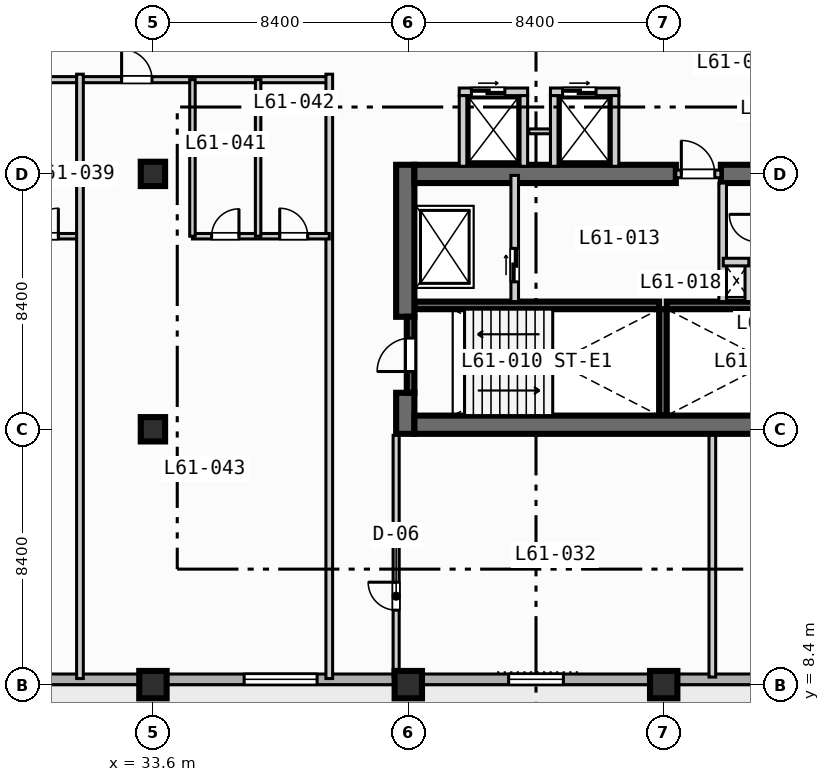
"""IFC4 building model, lengths in metres.
Left out: names, types, materials, properties, quantities, classifications, styles, units other than length and angle.
Written with IfcOpenShell. Run it as: python <this file> out.ifc"""

import sys

from ifc_helpers import new_model, si_unit, direction, frame, frame_2d, origin, origin_2d, place, context, subcontext, project, spatial, rectangle, extrude, element, fill, save


model = new_model("IFC4")
c1 = context("Model", 3, precision=1e-05, world=origin(), true_north=direction((0.0, 1.0)))
c2 = subcontext(c1, "Body", "Model", "MODEL_VIEW")
j1 = project(units=[si_unit("LENGTHUNIT", "METRE"), si_unit("PLANEANGLEUNIT", "RADIAN")], contexts=[c1])
p1 = place(None, origin())
s1 = spatial("IfcSite", under=j1, at=p1, CompositionType="ELEMENT")
p2 = place(p1, origin())
s2 = spatial("IfcBuilding", under=s1, at=p2, CompositionType="ELEMENT")
p3 = place(p2, frame((0.0, 0.0, 249.0)))
s3 = spatial("IfcBuildingStorey", under=s2, at=p3, CompositionType="ELEMENT", Elevation=249.0)
for number, where, z_axis, x_axis in (
    (1, (42.2, 20.875, 0.0), (0.0, 0.0, 1.0), (1.0, 0.0, 0.0)),
    (2, (50.5, 20.875, 0.0), (0.0, 0.0, 1.0), (1.0, 0.0, 0.0)),
):
    element("IfcWall", number, at=place(p3, frame(where, z_axis=z_axis, x_axis=x_axis)), inside=s3, PredefinedType="SOLIDWALL", context=c2, shape_type="SweptSolid", body=[
        extrude(rectangle(XDim=8.05, YDim=0.25, at=frame_2d((4.025, 0.0))), origin(), (0.0, 0.0, 1.0), 3.47),
    ])
p4 = place(p3, frame((50.375, 17.25, 0.0), z_axis=(0.0, 0.0, 1.0), x_axis=(0.0, 1.0, 0.0)))
e3 = element("IfcWall", 3, at=p4, inside=s3, PredefinedType="SOLIDWALL", context=c2, shape_type="SweptSolid", body=[
    extrude(rectangle(XDim=3.5, YDim=0.25, at=frame_2d((1.75, 0.0))), origin(), (0.0, 0.0, 1.0), 3.47),
])
p5 = place(p3, frame((41.9, 16.65, 0.0), z_axis=(0.0, 0.0, 1.0), x_axis=(0.0, 1.0, 0.0)))
e4 = element("IfcWall", 4, at=p5, inside=s3, PredefinedType="SHEAR", context=c2, shape_type="SweptSolid", body=[
    extrude(rectangle(XDim=1.35, YDim=0.6, at=frame_2d((0.675, 0.0))), origin(), (0.0, 0.0, 1.0), 3.47),
])
p6 = place(p3, frame((41.9, 20.5, 0.0), z_axis=(0.0, 0.0, 1.0), x_axis=(0.0, 1.0, 0.0)))
e5 = element("IfcWall", 5, at=p6, inside=s3, PredefinedType="SHEAR", context=c2, shape_type="SweptSolid", body=[
    extrude(rectangle(XDim=5.0, YDim=0.6, at=frame_2d((2.5, 0.0))), origin(), (0.0, 0.0, 1.0), 3.47),
])
p7 = place(p3, frame((42.2, 16.95, 0.0), z_axis=(0.0, 0.0, 1.0), x_axis=(1.0, 0.0, 0.0)))
e6 = element("IfcWall", 6, at=p7, inside=s3, PredefinedType="SHEAR", context=c2, shape_type="SweptSolid", body=[
    extrude(rectangle(XDim=16.35, YDim=0.6, at=frame_2d((8.175, 0.0))), origin(), (0.0, 0.0, 1.0), 3.47),
])
p8 = place(p3, frame((42.2, 25.2, 0.0), z_axis=(0.0, 0.0, 1.0), x_axis=(1.0, 0.0, 0.0)))
e7 = element("IfcWall", 7, at=p8, inside=s3, PredefinedType="SHEAR", context=c2, shape_type="SweptSolid", body=[
    extrude(rectangle(XDim=8.6, YDim=0.6, at=frame_2d((4.3, 0.0))), origin(), (0.0, 0.0, 1.0), 3.47),
])
p9 = place(p3, frame((52.28, 25.2, 0.0), z_axis=(0.0, 0.0, 1.0), x_axis=(1.0, 0.0, 0.0)))
e8 = element("IfcWall", 8, at=p9, inside=s3, PredefinedType="SHEAR", context=c2, shape_type="SweptSolid", body=[
    extrude(rectangle(XDim=1.27, YDim=0.6, at=frame_2d((0.635, 0.0))), origin(), (0.0, 0.0, 1.0), 3.47),
])
p10 = place(p3, frame((33.6, 8.4, 0.0), z_axis=(0.0, 0.0, 1.0), x_axis=(1.0, 0.0, 0.0)))
e9 = element("IfcColumn", 9, at=p10, inside=s3, PredefinedType="COLUMN", context=c2, shape_type="SweptSolid", body=[
    extrude(rectangle(XDim=0.9, YDim=0.9, at=origin_2d()), origin(), (0.0, 0.0, 1.0), 3.7),
])
for number, where, z_axis, x_axis in (
    (10, (33.6, 16.8, 0.0), (0.0, 0.0, 1.0), (1.0, 0.0, 0.0)),
    (11, (33.6, 25.2, 0.0), (0.0, 0.0, 1.0), (1.0, 0.0, 0.0)),
):
    element("IfcColumn", number, at=place(p3, frame(where, z_axis=z_axis, x_axis=x_axis)), inside=s3, PredefinedType="COLUMN", context=c2, shape_type="SweptSolid", body=[
        extrude(rectangle(XDim=0.8, YDim=0.8, at=origin_2d()), origin(), (0.0, 0.0, 1.0), 3.7),
    ])
for number, where, z_axis, x_axis in (
    (12, (42.0, 8.4, 0.0), (0.0, 0.0, 1.0), (1.0, 0.0, 0.0)),
    (13, (50.4, 8.4, 0.0), (0.0, 0.0, 1.0), (1.0, 0.0, 0.0)),
):
    element("IfcColumn", number, at=place(p3, frame(where, z_axis=z_axis, x_axis=x_axis)), inside=s3, PredefinedType="COLUMN", context=c2, shape_type="SweptSolid", body=[
        extrude(rectangle(XDim=0.9, YDim=0.9, at=origin_2d()), origin(), (0.0, 0.0, 1.0), 3.7),
    ])
p11 = place(p3, frame((72.425, 8.575, 0.0), z_axis=(0.0, 0.0, 1.0), x_axis=(-1.0, 0.0, 0.0)))
e14 = element("IfcWall", 14, at=p11, inside=s3, PredefinedType="STANDARD", context=c2, shape_type="SweptSolid", body=[
    extrude(rectangle(XDim=60.85, YDim=0.35, at=frame_2d((30.425, 0.0))), origin(), (0.0, 0.0, 1.0), 3.47),
])
p12 = place(p11, frame((42.325, 0.0, 0.0)))
e15 = element("IfcOpeningElement", 15, at=p12, cuts=e14, PredefinedType="OPENING", context=c2, shape_type="SweptSolid", body=[
    extrude(rectangle(XDim=1.4, YDim=2.2, at=frame_2d((0.7, 1.1))), frame((0.0, 0.185, 0.0), z_axis=(0.0, -1.0, 0.0), x_axis=(1.0, 0.0, 0.0)), (0.0, 0.0, 1.0), 0.37),
])
p13 = place(p11, frame((50.225, 0.0, 0.85)))
e16 = element("IfcOpeningElement", 16, at=p13, cuts=e14, PredefinedType="OPENING", context=c2, shape_type="SweptSolid", body=[
    extrude(rectangle(XDim=2.4, YDim=1.95, at=frame_2d((1.2, 0.975))), frame((0.0, 0.185, 0.0), z_axis=(0.0, -1.0, 0.0), x_axis=(1.0, 0.0, 0.0)), (0.0, 0.0, 1.0), 0.37),
])
p14 = place(p11, frame((33.425, 0.0, 0.85)))
e17 = element("IfcOpeningElement", 17, at=p14, cuts=e14, PredefinedType="OPENING", context=c2, shape_type="SweptSolid", body=[
    extrude(rectangle(XDim=2.4, YDim=1.95, at=frame_2d((1.2, 0.975))), frame((0.0, 0.185, 0.0), z_axis=(0.0, -1.0, 0.0), x_axis=(1.0, 0.0, 0.0)), (0.0, 0.0, 1.0), 0.37),
])
p15 = place(p11, frame((25.325, 0.0, 0.85)))
e18 = element("IfcOpeningElement", 18, at=p15, cuts=e14, PredefinedType="OPENING", context=c2, shape_type="SweptSolid", body=[
    extrude(rectangle(XDim=1.8, YDim=1.8, at=frame_2d((0.9, 0.9))), frame((0.0, 0.185, 0.0), z_axis=(0.0, -1.0, 0.0), x_axis=(1.0, 0.0, 0.0)), (0.0, 0.0, 1.0), 0.37),
])
p16 = place(p11, frame((58.675, 0.0, 0.85)))
e19 = element("IfcOpeningElement", 19, at=p16, cuts=e14, PredefinedType="OPENING", context=c2, shape_type="SweptSolid", body=[
    extrude(rectangle(XDim=1.8, YDim=1.8, at=frame_2d((0.9, 0.9))), frame((0.0, 0.185, 0.0), z_axis=(0.0, -1.0, 0.0), x_axis=(1.0, 0.0, 0.0)), (0.0, 0.0, 1.0), 0.37),
])
p17 = place(p3, frame((42.075, 18.0, 0.0), z_axis=(0.0, 0.0, 1.0), x_axis=(0.0, 1.0, 0.0)))
e20 = element("IfcWall", 20, at=p17, inside=s3, PredefinedType="SOLIDWALL", context=c2, shape_type="SweptSolid", body=[
    extrude(rectangle(XDim=2.5, YDim=0.25, at=frame_2d((1.25, 0.0))), origin(), (0.0, 0.0, 1.0), 3.47),
])
p18 = place(p17, frame((0.7, 0.0, 0.0)))
e21 = element("IfcOpeningElement", 21, at=p18, cuts=e20, PredefinedType="OPENING", context=c2, shape_type="SweptSolid", body=[
    extrude(rectangle(XDim=1.1, YDim=2.15, at=frame_2d((0.55, 1.075))), frame((0.0, 0.135, 0.0), z_axis=(0.0, -1.0, 0.0), x_axis=(1.0, 0.0, 0.0)), (0.0, 0.0, 1.0), 0.27),
])
p19 = place(p3, frame((45.5, 21.0, 0.0), z_axis=(0.0, 0.0, 1.0), x_axis=(0.0, 1.0, 0.0)))
e22 = element("IfcWall", 22, at=p19, inside=s3, PredefinedType="SOLIDWALL", context=c2, shape_type="SweptSolid", body=[
    extrude(rectangle(XDim=4.15, YDim=0.25, at=frame_2d((2.075, 0.0))), origin(), (0.0, 0.0, 1.0), 3.47),
])
p20 = place(p19, frame((0.65, 0.0, 0.0)))
e23 = element("IfcOpeningElement", 23, at=p20, cuts=e22, PredefinedType="OPENING", context=c2, shape_type="SweptSolid", body=[
    extrude(rectangle(XDim=1.1, YDim=2.15, at=frame_2d((0.55, 1.075))), frame((0.0, 0.135, 0.0), z_axis=(0.0, -1.0, 0.0), x_axis=(1.0, 0.0, 0.0)), (0.0, 0.0, 1.0), 0.27),
])
p21 = place(p3, frame((50.8, 25.2, 0.0), z_axis=(0.0, 0.0, 1.0), x_axis=(1.0, 0.0, 0.0)))
e24 = element("IfcWall", 24, at=p21, inside=s3, PredefinedType="SOLIDWALL", context=c2, shape_type="SweptSolid", body=[
    extrude(rectangle(XDim=1.48, YDim=0.25, at=frame_2d((0.74, 0.0))), origin(), (0.0, 0.0, 1.0), 3.47),
])
p22 = place(p21, frame((0.18, 0.0, 0.0)))
e25 = element("IfcOpeningElement", 25, at=p22, cuts=e24, PredefinedType="OPENING", context=c2, shape_type="SweptSolid", body=[
    extrude(rectangle(XDim=1.1, YDim=2.15, at=frame_2d((0.55, 1.075))), frame((0.0, 0.135, 0.0), z_axis=(0.0, -1.0, 0.0), x_axis=(1.0, 0.0, 0.0)), (0.0, 0.0, 1.0), 0.27),
])
p23 = place(p3, frame((52.34, 21.0, 0.0), z_axis=(0.0, 0.0, 1.0), x_axis=(0.0, 1.0, 0.0)))
e26 = element("IfcWall", 26, at=p23, inside=s3, PredefinedType="SOLIDWALL", context=c2, shape_type="SweptSolid", body=[
    extrude(rectangle(XDim=3.9, YDim=0.25, at=frame_2d((1.95, 0.0))), origin(), (0.0, 0.0, 1.0), 3.47),
])
p24 = place(p3, frame((53.2, 21.0, 0.0), z_axis=(0.0, 0.0, 1.0), x_axis=(0.0, 1.0, 0.0)))
e27 = element("IfcWall", 27, at=p24, inside=s3, PredefinedType="SOLIDWALL", context=c2, shape_type="SweptSolid", body=[
    extrude(rectangle(XDim=1.3, YDim=0.25, at=frame_2d((0.65, 0.0))), origin(), (0.0, 0.0, 1.0), 3.47),
])
p25 = place(p3, frame((52.36, 22.3, 0.0), z_axis=(0.0, 0.0, 1.0), x_axis=(1.0, 0.0, 0.0)))
e28 = element("IfcWall", 28, at=p25, inside=s3, PredefinedType="SOLIDWALL", context=c2, shape_type="SweptSolid", body=[
    extrude(rectangle(XDim=0.84, YDim=0.25, at=frame_2d((0.42, 0.0))), origin(), (0.0, 0.0, 1.0), 3.47),
])
p26 = place(p3, frame((43.675, 27.9, 0.0), z_axis=(0.0, 0.0, 1.0), x_axis=(1.0, 0.0, 0.0)))
e29 = element("IfcWall", 29, at=p26, inside=s3, PredefinedType="SOLIDWALL", context=c2, shape_type="SweptSolid", body=[
    extrude(rectangle(XDim=2.25, YDim=0.25, at=frame_2d((1.125, 0.0))), origin(), (0.0, 0.0, 1.0), 3.47),
])
p27 = place(p26, frame((0.4, 0.0, 0.0)))
e30 = element("IfcOpeningElement", 30, at=p27, cuts=e29, PredefinedType="OPENING", context=c2, shape_type="SweptSolid", body=[
    extrude(rectangle(XDim=1.1, YDim=2.15, at=frame_2d((0.55, 1.075))), frame((0.0, 0.135, 0.0), z_axis=(0.0, -1.0, 0.0), x_axis=(1.0, 0.0, 0.0)), (0.0, 0.0, 1.0), 0.27),
])
for number, where, z_axis, x_axis in (
    (31, (43.8, 25.45, 0.0), (0.0, 0.0, 1.0), (0.0, 1.0, 0.0)),
    (32, (45.8, 25.45, 0.0), (0.0, 0.0, 1.0), (0.0, 1.0, 0.0)),
):
    element("IfcWall", number, at=place(p3, frame(where, z_axis=z_axis, x_axis=x_axis)), inside=s3, PredefinedType="SOLIDWALL", context=c2, shape_type="SweptSolid", body=[
        extrude(rectangle(XDim=2.325, YDim=0.25, at=frame_2d((1.163, 0.0))), origin(), (0.0, 0.0, 1.0), 3.47),
    ])
p28 = place(p3, frame((45.96, 26.6, 0.0), z_axis=(0.0, 0.0, 1.0), x_axis=(1.0, 0.0, 0.0)))
e33 = element("IfcWall", 33, at=p28, inside=s3, PredefinedType="PARTITIONING", context=c2, shape_type="SweptSolid", body=[
    extrude(rectangle(XDim=0.88, YDim=0.16, at=frame_2d((0.44, 0.0))), origin(), (0.0, 0.0, 1.0), 3.47),
])
p29 = place(p3, frame((46.675, 27.9, 0.0), z_axis=(0.0, 0.0, 1.0), x_axis=(1.0, 0.0, 0.0)))
e34 = element("IfcWall", 34, at=p29, inside=s3, PredefinedType="SOLIDWALL", context=c2, shape_type="SweptSolid", body=[
    extrude(rectangle(XDim=2.25, YDim=0.25, at=frame_2d((1.125, 0.0))), origin(), (0.0, 0.0, 1.0), 3.47),
])
p30 = place(p29, frame((0.4, 0.0, 0.0)))
e35 = element("IfcOpeningElement", 35, at=p30, cuts=e34, PredefinedType="OPENING", context=c2, shape_type="SweptSolid", body=[
    extrude(rectangle(XDim=1.1, YDim=2.15, at=frame_2d((0.55, 1.075))), frame((0.0, 0.135, 0.0), z_axis=(0.0, -1.0, 0.0), x_axis=(1.0, 0.0, 0.0)), (0.0, 0.0, 1.0), 0.27),
])
for number, where, z_axis, x_axis in (
    (36, (46.8, 25.45, 0.0), (0.0, 0.0, 1.0), (0.0, 1.0, 0.0)),
    (37, (48.8, 25.45, 0.0), (0.0, 0.0, 1.0), (0.0, 1.0, 0.0)),
):
    element("IfcWall", number, at=place(p3, frame(where, z_axis=z_axis, x_axis=x_axis)), inside=s3, PredefinedType="SOLIDWALL", context=c2, shape_type="SweptSolid", body=[
        extrude(rectangle(XDim=2.325, YDim=0.25, at=frame_2d((1.163, 0.0))), origin(), (0.0, 0.0, 1.0), 3.47),
    ])
p31 = place(p3, frame((41.6, 8.65, 0.0), z_axis=(0.0, 0.0, 1.0), x_axis=(0.0, 1.0, 0.0)))
e38 = element("IfcWall", 38, at=p31, inside=s3, PredefinedType="PARTITIONING", context=c2, shape_type="SweptSolid", body=[
    extrude(rectangle(XDim=7.95, YDim=0.2, at=frame_2d((3.975, 0.0))), origin(), (0.0, 0.0, 1.0), 3.47),
])
p32 = place(p31, frame((2.2, 0.0, 0.0)))
e39 = element("IfcOpeningElement", 39, at=p32, cuts=e38, PredefinedType="OPENING", context=c2, shape_type="SweptSolid", body=[
    extrude(rectangle(XDim=0.92, YDim=2.1, at=frame_2d((0.46, 1.05))), frame((0.0, 0.11, 0.0), z_axis=(0.0, -1.0, 0.0), x_axis=(1.0, 0.0, 0.0)), (0.0, 0.0, 1.0), 0.22),
])
p33 = place(p3, frame((52.0, 8.65, 0.0), z_axis=(0.0, 0.0, 1.0), x_axis=(0.0, 1.0, 0.0)))
e40 = element("IfcWall", 40, at=p33, inside=s3, PredefinedType="PARTITIONING", context=c2, shape_type="SweptSolid", body=[
    extrude(rectangle(XDim=7.95, YDim=0.22, at=frame_2d((3.975, 0.0))), origin(), (0.0, 0.0, 1.0), 3.47),
])
p34 = place(p3, frame((11.8, 28.3, 0.0), z_axis=(0.0, 0.0, 1.0), x_axis=(1.0, 0.0, 0.0)))
e41 = element("IfcWall", 41, at=p34, inside=s3, PredefinedType="PARTITIONING", context=c2, shape_type="SweptSolid", body=[
    extrude(rectangle(XDim=27.6, YDim=0.2, at=frame_2d((13.8, 0.0))), origin(), (0.0, 0.0, 1.0), 3.47),
])
p35 = place(p34, frame((3.92, 0.0, 0.0)))
e42 = element("IfcOpeningElement", 42, at=p35, cuts=e41, PredefinedType="OPENING", context=c2, shape_type="SweptSolid", body=[
    extrude(rectangle(XDim=1.0, YDim=2.15, at=frame_2d((0.5, 1.075))), frame((0.0, 0.11, 0.0), z_axis=(0.0, -1.0, 0.0), x_axis=(1.0, 0.0, 0.0)), (0.0, 0.0, 1.0), 0.22),
])
p36 = place(p34, frame((12.57, 0.0, 0.0)))
e43 = element("IfcOpeningElement", 43, at=p36, cuts=e41, PredefinedType="OPENING", context=c2, shape_type="SweptSolid", body=[
    extrude(rectangle(XDim=1.0, YDim=2.15, at=frame_2d((0.5, 1.075))), frame((0.0, 0.11, 0.0), z_axis=(0.0, -1.0, 0.0), x_axis=(1.0, 0.0, 0.0)), (0.0, 0.0, 1.0), 0.22),
])
p37 = place(p34, frame((20.77, 0.0, 0.0)))
e44 = element("IfcOpeningElement", 44, at=p37, cuts=e41, PredefinedType="OPENING", context=c2, shape_type="SweptSolid", body=[
    extrude(rectangle(XDim=1.0, YDim=2.15, at=frame_2d((0.5, 1.075))), frame((0.0, 0.11, 0.0), z_axis=(0.0, -1.0, 0.0), x_axis=(1.0, 0.0, 0.0)), (0.0, 0.0, 1.0), 0.22),
])
p38 = place(p3, frame((26.7, 23.15, 0.0), z_axis=(0.0, 0.0, 1.0), x_axis=(1.0, 0.0, 0.0)))
e45 = element("IfcWall", 45, at=p38, inside=s3, PredefinedType="PLUMBINGWALL", context=c2, shape_type="SweptSolid", body=[
    extrude(rectangle(XDim=4.5, YDim=0.18, at=frame_2d((2.25, 0.0))), origin(), (0.0, 0.0, 1.0), 3.47),
])
p39 = place(p38, frame((0.63, 0.0, 0.0)))
e46 = element("IfcOpeningElement", 46, at=p39, cuts=e45, PredefinedType="OPENING", context=c2, shape_type="SweptSolid", body=[
    extrude(rectangle(XDim=0.9, YDim=2.1, at=frame_2d((0.45, 1.05))), frame((0.0, 0.1, 0.0), z_axis=(0.0, -1.0, 0.0), x_axis=(1.0, 0.0, 0.0)), (0.0, 0.0, 1.0), 0.2),
])
p40 = place(p38, frame((2.87, 0.0, 0.0)))
e47 = element("IfcOpeningElement", 47, at=p40, cuts=e45, PredefinedType="OPENING", context=c2, shape_type="SweptSolid", body=[
    extrude(rectangle(XDim=0.92, YDim=2.1, at=frame_2d((0.46, 1.05))), frame((0.0, 0.1, 0.0), z_axis=(0.0, -1.0, 0.0), x_axis=(1.0, 0.0, 0.0)), (0.0, 0.0, 1.0), 0.2),
])
for number, where, z_axis, x_axis in (
    (48, (31.2, 8.6, 0.0), (0.0, 0.0, 1.0), (0.0, 1.0, 0.0)),
    (49, (39.4, 8.6, 0.0), (0.0, 0.0, 1.0), (0.0, 1.0, 0.0)),
):
    element("IfcWall", number, at=place(p3, frame(where, z_axis=z_axis, x_axis=x_axis)), inside=s3, PredefinedType="PARTITIONING", context=c2, shape_type="SweptSolid", body=[
        extrude(rectangle(XDim=19.88, YDim=0.22, at=frame_2d((9.94, 0.0))), origin(), (0.0, 0.0, 1.0), 3.47),
    ])
p41 = place(p3, frame((34.9, 23.15, 0.0), z_axis=(0.0, 0.0, 1.0), x_axis=(1.0, 0.0, 0.0)))
e50 = element("IfcWall", 50, at=p41, inside=s3, PredefinedType="PLUMBINGWALL", context=c2, shape_type="SweptSolid", body=[
    extrude(rectangle(XDim=4.5, YDim=0.18, at=frame_2d((2.25, 0.0))), origin(), (0.0, 0.0, 1.0), 3.47),
])
p42 = place(p41, frame((0.63, 0.0, 0.0)))
e51 = element("IfcOpeningElement", 51, at=p42, cuts=e50, PredefinedType="OPENING", context=c2, shape_type="SweptSolid", body=[
    extrude(rectangle(XDim=0.9, YDim=2.1, at=frame_2d((0.45, 1.05))), frame((0.0, 0.1, 0.0), z_axis=(0.0, -1.0, 0.0), x_axis=(1.0, 0.0, 0.0)), (0.0, 0.0, 1.0), 0.2),
])
p43 = place(p41, frame((2.87, 0.0, 0.0)))
e52 = element("IfcOpeningElement", 52, at=p43, cuts=e50, PredefinedType="OPENING", context=c2, shape_type="SweptSolid", body=[
    extrude(rectangle(XDim=0.92, YDim=2.1, at=frame_2d((0.46, 1.05))), frame((0.0, 0.1, 0.0), z_axis=(0.0, -1.0, 0.0), x_axis=(1.0, 0.0, 0.0)), (0.0, 0.0, 1.0), 0.2),
])
for number, where, z_axis, x_axis in (
    (53, (34.9, 23.15, 0.0), (0.0, 0.0, 1.0), (0.0, 1.0, 0.0)),
    (54, (37.06, 23.15, 0.0), (0.0, 0.0, 1.0), (0.0, 1.0, 0.0)),
):
    element("IfcWall", number, at=place(p3, frame(where, z_axis=z_axis, x_axis=x_axis)), inside=s3, PredefinedType="PLUMBINGWALL", context=c2, shape_type="SweptSolid", body=[
        extrude(rectangle(XDim=5.15, YDim=0.18, at=frame_2d((2.575, 0.0))), origin(), (0.0, 0.0, 1.0), 3.47),
    ])
p44 = place(p14, origin())
e55 = element("IfcWindow", 55, at=p44, inside=s3, PartitioningType="SINGLE_PANEL", PredefinedType="WINDOW", context=c2, shape_type="SweptSolid", body=[
    extrude(rectangle(XDim=2.4, YDim=1.95, at=frame_2d((1.2, 0.975))), frame((0.0, 0.03, 0.0), z_axis=(0.0, -1.0, 0.0), x_axis=(1.0, 0.0, 0.0)), (0.0, 0.0, 1.0), 0.06),
])
fill(e17, e55)
p45 = place(p15, origin())
e56 = element("IfcWindow", 56, at=p45, inside=s3, PartitioningType="SINGLE_PANEL", PredefinedType="WINDOW", context=c2, shape_type="SweptSolid", body=[
    extrude(rectangle(XDim=1.8, YDim=1.8, at=frame_2d((0.9, 0.9))), frame((0.0, 0.03, 0.0), z_axis=(0.0, -1.0, 0.0), x_axis=(1.0, 0.0, 0.0)), (0.0, 0.0, 1.0), 0.06),
])
fill(e18, e56)
p46 = place(p18, origin())
e57 = element("IfcDoor", 57, at=p46, inside=s3, OperationType="SINGLE_SWING_LEFT", PredefinedType="DOOR", context=c2, shape_type="SweptSolid", body=[
    extrude(rectangle(XDim=1.1, YDim=2.15, at=frame_2d((0.55, 1.075))), frame((0.0, 0.025, 0.0), z_axis=(0.0, -1.0, 0.0), x_axis=(1.0, 0.0, 0.0)), (0.0, 0.0, 1.0), 0.05),
])
fill(e21, e57)
p47 = place(p20, origin())
e58 = element("IfcDoor", 58, at=p47, inside=s3, OperationType="SLIDING_TO_LEFT", PredefinedType="DOOR", context=c2, shape_type="SweptSolid", body=[
    extrude(rectangle(XDim=1.1, YDim=2.15, at=frame_2d((0.55, 1.075))), frame((0.0, 0.025, 0.0), z_axis=(0.0, -1.0, 0.0), x_axis=(1.0, 0.0, 0.0)), (0.0, 0.0, 1.0), 0.05),
])
fill(e23, e58)
p48 = place(p22, origin())
e59 = element("IfcDoor", 59, at=p48, inside=s3, OperationType="SINGLE_SWING_LEFT", PredefinedType="DOOR", context=c2, shape_type="SweptSolid", body=[
    extrude(rectangle(XDim=1.1, YDim=2.15, at=frame_2d((0.55, 1.075))), frame((0.0, 0.025, 0.0), z_axis=(0.0, -1.0, 0.0), x_axis=(1.0, 0.0, 0.0)), (0.0, 0.0, 1.0), 0.05),
])
fill(e25, e59)
p49 = place(p27, origin())
e60 = element("IfcDoor", 60, at=p49, inside=s3, OperationType="SLIDING_TO_LEFT", PredefinedType="DOOR", context=c2, shape_type="SweptSolid", body=[
    extrude(rectangle(XDim=1.1, YDim=2.15, at=frame_2d((0.55, 1.075))), frame((0.0, 0.025, 0.0), z_axis=(0.0, -1.0, 0.0), x_axis=(1.0, 0.0, 0.0)), (0.0, 0.0, 1.0), 0.05),
])
fill(e30, e60)
p50 = place(p30, origin())
e61 = element("IfcDoor", 61, at=p50, inside=s3, OperationType="SLIDING_TO_LEFT", PredefinedType="DOOR", context=c2, shape_type="SweptSolid", body=[
    extrude(rectangle(XDim=1.1, YDim=2.15, at=frame_2d((0.55, 1.075))), frame((0.0, 0.025, 0.0), z_axis=(0.0, -1.0, 0.0), x_axis=(1.0, 0.0, 0.0)), (0.0, 0.0, 1.0), 0.05),
])
fill(e35, e61)
p51 = place(p32, origin())
e62 = element("IfcDoor", 62, at=p51, inside=s3, OperationType="SINGLE_SWING_RIGHT", PredefinedType="DOOR", context=c2, shape_type="SweptSolid", body=[
    extrude(rectangle(XDim=0.92, YDim=2.1, at=frame_2d((0.46, 1.05))), frame((0.0, 0.025, 0.0), z_axis=(0.0, -1.0, 0.0), x_axis=(1.0, 0.0, 0.0)), (0.0, 0.0, 1.0), 0.05),
])
fill(e39, e62)
p52 = place(p37, origin())
e63 = element("IfcDoor", 63, at=p52, inside=s3, OperationType="SINGLE_SWING_LEFT", PredefinedType="DOOR", context=c2, shape_type="SweptSolid", body=[
    extrude(rectangle(XDim=1.0, YDim=2.15, at=frame_2d((0.5, 1.075))), frame((0.0, 0.025, 0.0), z_axis=(0.0, -1.0, 0.0), x_axis=(1.0, 0.0, 0.0)), (0.0, 0.0, 1.0), 0.05),
])
fill(e44, e63)
p53 = place(p40, origin())
e64 = element("IfcDoor", 64, at=p53, inside=s3, OperationType="SINGLE_SWING_RIGHT", PredefinedType="DOOR", context=c2, shape_type="SweptSolid", body=[
    extrude(rectangle(XDim=0.92, YDim=2.1, at=frame_2d((0.46, 1.05))), frame((0.0, 0.025, 0.0), z_axis=(0.0, -1.0, 0.0), x_axis=(1.0, 0.0, 0.0)), (0.0, 0.0, 1.0), 0.05),
])
fill(e47, e64)
p54 = place(p42, origin())
e65 = element("IfcDoor", 65, at=p54, inside=s3, OperationType="SINGLE_SWING_RIGHT", PredefinedType="DOOR", context=c2, shape_type="SweptSolid", body=[
    extrude(rectangle(XDim=0.9, YDim=2.1, at=frame_2d((0.45, 1.05))), frame((0.0, 0.025, 0.0), z_axis=(0.0, -1.0, 0.0), x_axis=(1.0, 0.0, 0.0)), (0.0, 0.0, 1.0), 0.05),
])
fill(e51, e65)
p55 = place(p43, origin())
e66 = element("IfcDoor", 66, at=p55, inside=s3, OperationType="SINGLE_SWING_LEFT", PredefinedType="DOOR", context=c2, shape_type="SweptSolid", body=[
    extrude(rectangle(XDim=0.92, YDim=2.1, at=frame_2d((0.46, 1.05))), frame((0.0, 0.025, 0.0), z_axis=(0.0, -1.0, 0.0), x_axis=(1.0, 0.0, 0.0)), (0.0, 0.0, 1.0), 0.05),
])
fill(e52, e66)
save(model, sys.argv[1])
